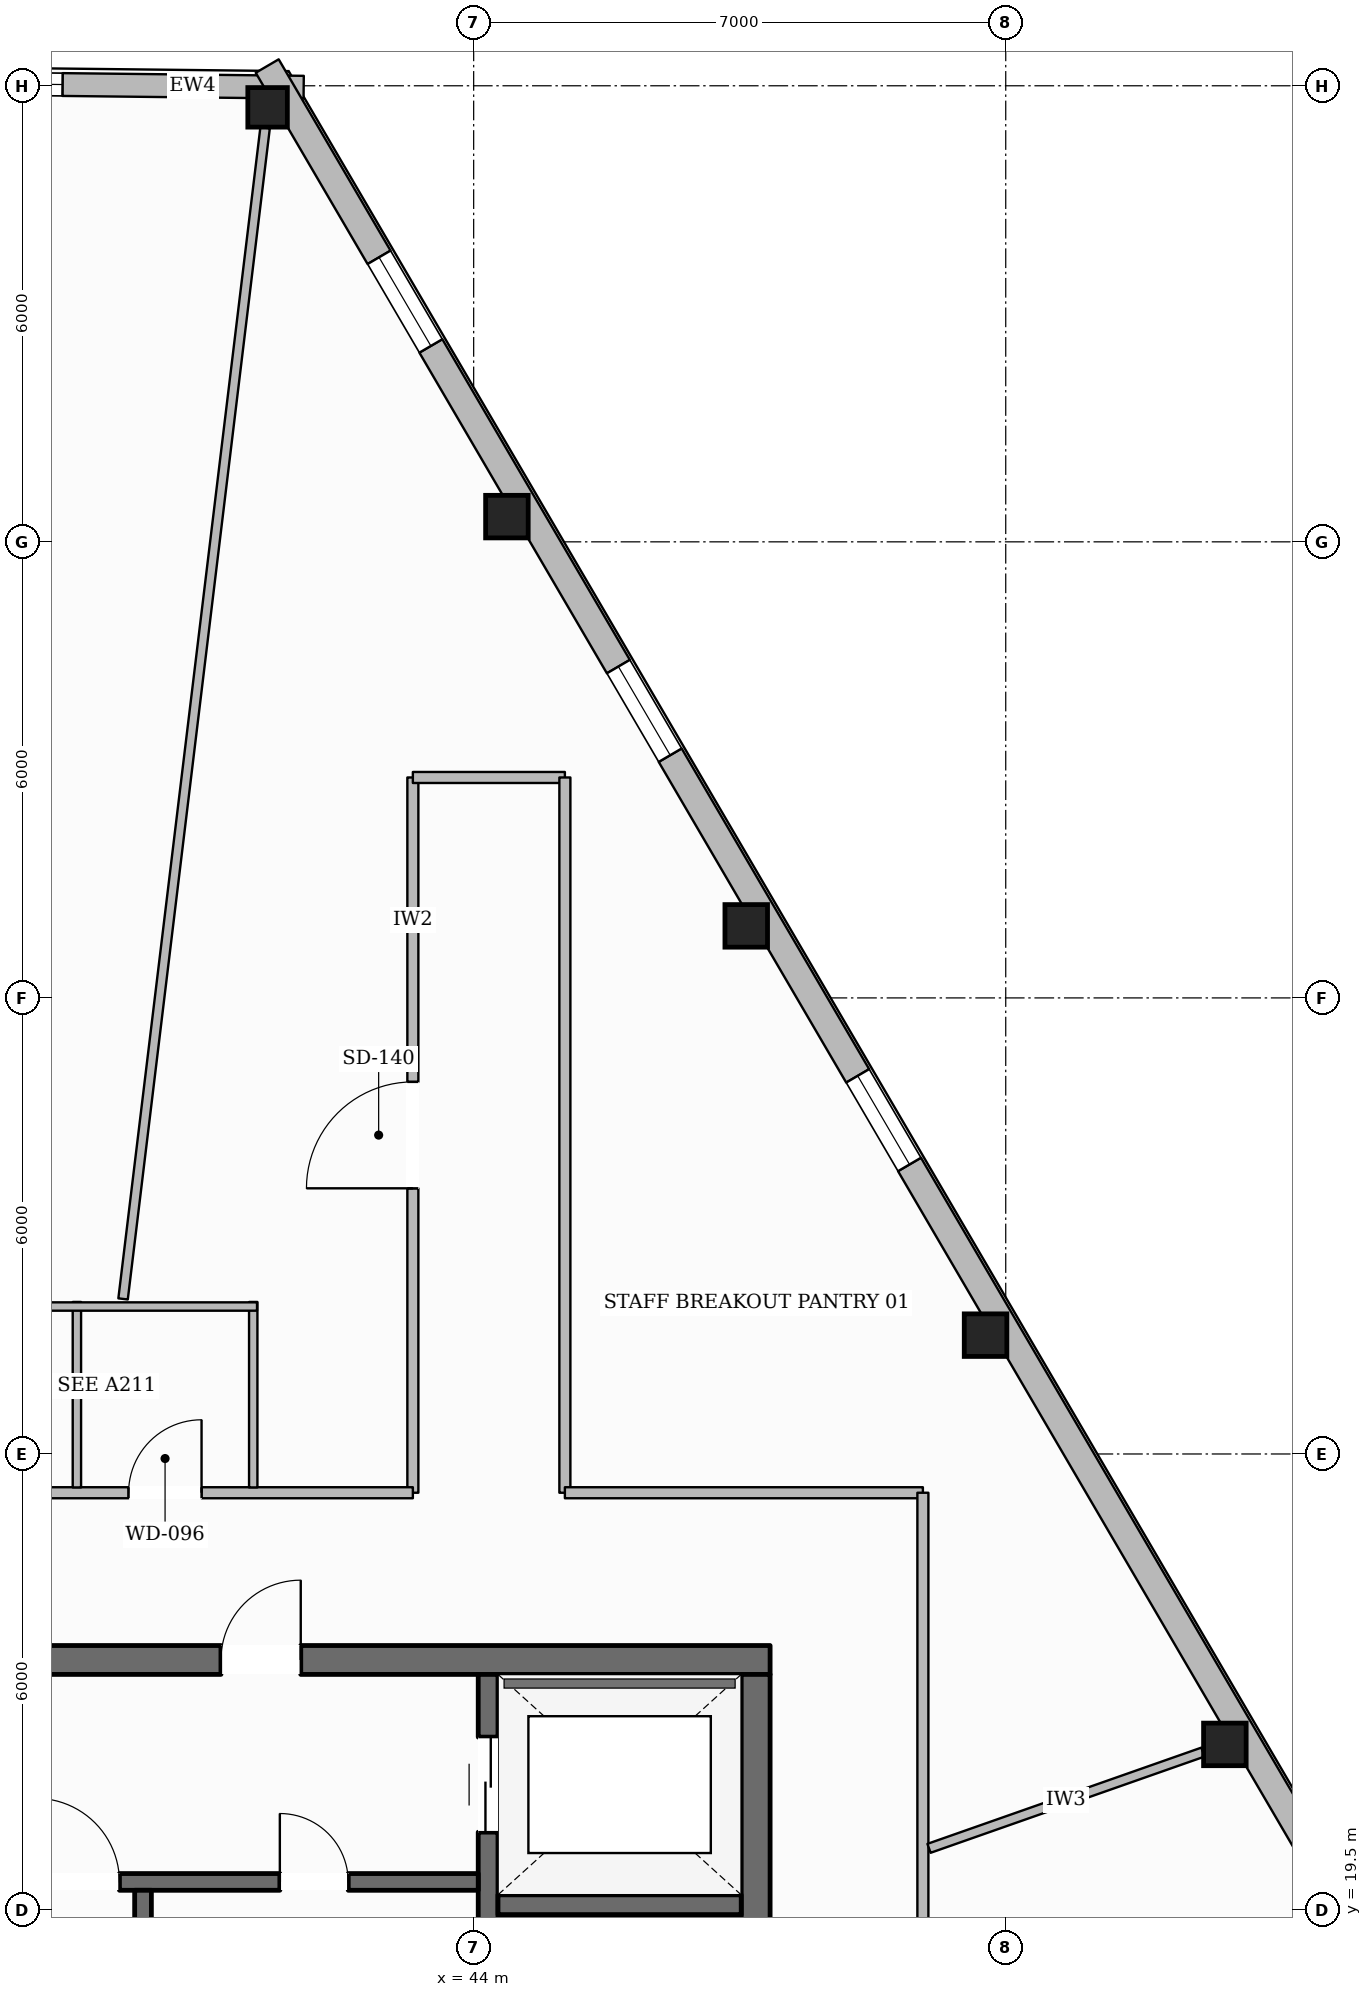
"""IFC4 building model, lengths in metres.
Left out: names, types, materials, properties, quantities, classifications, styles, units other than length and angle.
Written with IfcOpenShell. Run it as: python <this file> out.ifc"""

import sys

from ifc_helpers import new_model, si_unit, direction, frame, frame_2d, origin, origin_2d, place, context, subcontext, project, spatial, rectangle, hollow_rectangle, extrude, element, fill, save


model = new_model("IFC4")
c1 = context("Model", 3, precision=1e-05, world=origin(), true_north=direction((0.0, 1.0)))
c2 = subcontext(c1, "Body", "Model", "MODEL_VIEW")
j1 = project(units=[si_unit("LENGTHUNIT", "METRE"), si_unit("PLANEANGLEUNIT", "RADIAN")], contexts=[c1])
p1 = place(None, origin())
s1 = spatial("IfcSite", under=j1, at=p1, CompositionType="ELEMENT")
p2 = place(p1, origin())
s2 = spatial("IfcBuilding", under=s1, at=p2, CompositionType="ELEMENT")
p3 = place(p2, frame((0.0, 0.0, 258.75)))
s3 = spatial("IfcBuildingStorey", under=s2, at=p3, CompositionType="ELEMENT", Elevation=258.75)
p4 = place(p3, frame((28.1, 22.79, 0.0), z_axis=(0.0, 0.0, 1.0), x_axis=(1.0, 0.0, 0.0)))
e1 = element("IfcWall", 1, at=p4, inside=s3, PredefinedType="SOLIDWALL", context=c2, shape_type="SweptSolid", body=[
    extrude(rectangle(XDim=19.8, YDim=0.38, at=frame_2d((9.9, 0.0))), origin(), (0.0, 0.0, 1.0), 3.61),
])
p5 = place(p4, frame((6.175, 0.0, 0.0)))
e2 = element("IfcOpeningElement", 2, at=p5, cuts=e1, PredefinedType="OPENING", context=c2, shape_type="SweptSolid", body=[
    extrude(rectangle(XDim=1.05, YDim=2.15, at=frame_2d((0.525, 1.075))), frame((0.0, 0.2, 0.0), z_axis=(0.0, -1.0, 0.0), x_axis=(1.0, 0.0, 0.0)), (0.0, 0.0, 1.0), 0.4),
])
p6 = place(p4, frame((12.575, 0.0, 0.0)))
e3 = element("IfcOpeningElement", 3, at=p6, cuts=e1, PredefinedType="OPENING", context=c2, shape_type="SweptSolid", body=[
    extrude(rectangle(XDim=1.05, YDim=2.15, at=frame_2d((0.525, 1.075))), frame((0.0, 0.2, 0.0), z_axis=(0.0, -1.0, 0.0), x_axis=(1.0, 0.0, 0.0)), (0.0, 0.0, 1.0), 0.4),
])
p7 = place(p3, frame((47.71, 9.6, 0.0), z_axis=(0.0, 0.0, 1.0), x_axis=(0.0, 1.0, 0.0)))
e4 = element("IfcWall", 4, at=p7, inside=s3, PredefinedType="SOLIDWALL", context=c2, shape_type="SweptSolid", body=[
    extrude(rectangle(XDim=13.0, YDim=0.38, at=frame_2d((6.5, 0.0))), origin(), (0.0, 0.0, 1.0), 3.61),
])
p8 = place(p7, frame((0.2, 0.0, 0.0)))
e5 = element("IfcOpeningElement", 5, at=p8, cuts=e4, PredefinedType="OPENING", context=c2, shape_type="SweptSolid", body=[
    extrude(rectangle(XDim=1.1, YDim=2.15, at=frame_2d((0.55, 1.075))), frame((0.0, 0.2, 0.0), z_axis=(0.0, -1.0, 0.0), x_axis=(1.0, 0.0, 0.0)), (0.0, 0.0, 1.0), 0.4),
])
p9 = place(p7, frame((8.4, 0.0, 0.0)))
e6 = element("IfcOpeningElement", 6, at=p9, cuts=e4, PredefinedType="OPENING", context=c2, shape_type="SweptSolid", body=[
    extrude(rectangle(XDim=0.9, YDim=2.1, at=frame_2d((0.45, 1.05))), frame((0.0, 0.2, 0.0), z_axis=(0.0, -1.0, 0.0), x_axis=(1.0, 0.0, 0.0)), (0.0, 0.0, 1.0), 0.4),
])
p10 = place(p3, frame((44.19, 9.6, 0.0), z_axis=(0.0, 0.0, 1.0), x_axis=(0.0, 1.0, 0.0)))
e7 = element("IfcWall", 7, at=p10, inside=s3, PredefinedType="SHEAR", context=c2, shape_type="SweptSolid", body=[
    extrude(rectangle(XDim=13.0, YDim=0.26, at=frame_2d((6.5, 0.0))), origin(), (0.0, 0.0, 1.0), 3.61),
])
p11 = place(p10, frame((10.925, 0.0, 0.0)))
e8 = element("IfcOpeningElement", 8, at=p11, cuts=e7, PredefinedType="OPENING", context=c2, shape_type="SweptSolid", body=[
    extrude(rectangle(XDim=1.25, YDim=2.25, at=frame_2d((0.625, 1.125))), frame((0.0, 0.14, 0.0), z_axis=(0.0, -1.0, 0.0), x_axis=(1.0, 0.0, 0.0)), (0.0, 0.0, 1.0), 0.28),
])
p12 = place(p3, frame((44.32, 19.57, 0.0), z_axis=(0.0, 0.0, 1.0), x_axis=(1.0, 0.0, 0.0)))
e9 = element("IfcWall", 9, at=p12, inside=s3, PredefinedType="SHEAR", context=c2, shape_type="SweptSolid", body=[
    extrude(rectangle(XDim=3.2, YDim=0.26, at=frame_2d((1.6, 0.0))), origin(), (0.0, 0.0, 1.0), 3.61),
])
p13 = place(p3, frame((31.94, 19.87, 0.0), z_axis=(0.0, 0.0, 1.0), x_axis=(1.0, 0.0, 0.0)))
e10 = element("IfcWall", 10, at=p13, inside=s3, PredefinedType="SOLIDWALL", context=c2, shape_type="SweptSolid", body=[
    extrude(rectangle(XDim=12.12, YDim=0.22, at=frame_2d((6.06, 0.0))), origin(), (0.0, 0.0, 1.0), 3.61),
])
p14 = place(p13, frame((6.3, 0.0, 0.0)))
e11 = element("IfcOpeningElement", 11, at=p14, cuts=e10, PredefinedType="OPENING", context=c2, shape_type="SweptSolid", body=[
    extrude(rectangle(XDim=1.1, YDim=2.15, at=frame_2d((0.55, 1.075))), frame((0.0, 0.12, 0.0), z_axis=(0.0, -1.0, 0.0), x_axis=(1.0, 0.0, 0.0)), (0.0, 0.0, 1.0), 0.24),
])
p15 = place(p13, frame((9.51, 0.0, 0.0)))
e12 = element("IfcOpeningElement", 12, at=p15, cuts=e10, PredefinedType="OPENING", context=c2, shape_type="SweptSolid", body=[
    extrude(rectangle(XDim=0.9, YDim=2.1, at=frame_2d((0.45, 1.05))), frame((0.0, 0.12, 0.0), z_axis=(0.0, -1.0, 0.0), x_axis=(1.0, 0.0, 0.0)), (0.0, 0.0, 1.0), 0.24),
])
p16 = place(p3, frame((39.65, 16.56, 0.0), z_axis=(0.0, 0.0, 1.0), x_axis=(0.0, 1.0, 0.0)))
e13 = element("IfcWall", 13, at=p16, inside=s3, PredefinedType="SOLIDWALL", context=c2, shape_type="SweptSolid", body=[
    extrude(rectangle(XDim=3.2, YDim=0.22, at=frame_2d((1.6, 0.0))), origin(), (0.0, 0.0, 1.0), 3.61),
])
for number, where, z_axis, x_axis in (
    (14, (53.883, 21.679, 0.0), (0.0, 0.0, 1.0), (1.0, 0.0, 0.0)),
    (15, (50.734, 27.063, 0.0), (0.0, 0.0, 1.0), (1.0, 0.0, 0.0)),
    (16, (47.586, 32.448, 0.0), (0.0, 0.0, 1.0), (1.0, 0.0, 0.0)),
    (17, (44.437, 37.832, 0.0), (0.0, 0.0, 1.0), (1.0, 0.0, 0.0)),
):
    element("IfcColumn", number, at=place(p3, frame(where, z_axis=z_axis, x_axis=x_axis)), inside=s3, PredefinedType="COLUMN", context=c2, shape_type="SweptSolid", body=[
        extrude(hollow_rectangle(XDim=0.56, YDim=0.56, WallThickness=0.025, at=origin_2d()), origin(), (0.0, 0.0, 1.0), 3.61),
    ])
p17 = place(p3, frame((41.289, 43.216, 0.0), z_axis=(0.0, 0.0, 1.0), x_axis=(1.0, 0.0, 0.0)))
e18 = element("IfcColumn", 18, at=p17, inside=s3, PredefinedType="COLUMN", context=c2, shape_type="SweptSolid", body=[
    extrude(hollow_rectangle(XDim=0.52, YDim=0.52, WallThickness=0.024, at=origin_2d()), origin(), (0.0, 0.0, 1.0), 3.61),
])
p18 = place(p3, frame((34.367, 43.564, 0.0), z_axis=(0.0, 0.0, 1.0), x_axis=(0.999937028375, -0.011222267359, 0.0)))
e19 = element("IfcWall", 19, at=p18, inside=s3, PredefinedType="STANDARD", context=c2, shape_type="SweptSolid", body=[
    extrude(rectangle(XDim=7.397, YDim=0.3, at=frame_2d((3.698, 0.0))), origin(), (0.0, 0.0, 1.0), 3.196),
])
p19 = place(p18, frame((3.173, 0.0, 0.65)))
e20 = element("IfcOpeningElement", 20, at=p19, cuts=e19, PredefinedType="OPENING", context=c2, shape_type="SweptSolid", body=[
    extrude(rectangle(XDim=1.05, YDim=1.7, at=frame_2d((0.525, 0.85))), frame((0.0, 0.16, 0.0), z_axis=(0.0, -1.0, 0.0), x_axis=(1.0, 0.0, 0.0)), (0.0, 0.0, 1.0), 0.32),
])
p20 = place(p3, frame((41.284, 43.76, 0.0), z_axis=(0.0, 0.0, 1.0), x_axis=(0.50479404613, -0.863239810824, 0.0)))
e21 = element("IfcWall", 21, at=p20, inside=s3, PredefinedType="STANDARD", context=c2, shape_type="SweptSolid", body=[
    extrude(rectangle(XDim=38.372, YDim=0.35, at=frame_2d((19.186, 0.0))), origin(), (0.0, 0.0, 1.0), 3.196),
])
p21 = place(p20, frame((34.102, 0.0, 0.65)))
e22 = element("IfcOpeningElement", 22, at=p21, cuts=e21, PredefinedType="OPENING", context=c2, shape_type="SweptSolid", body=[
    extrude(rectangle(XDim=1.35, YDim=1.75, at=frame_2d((0.675, 0.875))), frame((0.0, 0.185, 0.0), z_axis=(0.0, -1.0, 0.0), x_axis=(1.0, 0.0, 0.0)), (0.0, 0.0, 1.0), 0.37),
])
p22 = place(p20, frame((27.864, 0.0, 0.65)))
e23 = element("IfcOpeningElement", 23, at=p22, cuts=e21, PredefinedType="OPENING", context=c2, shape_type="SweptSolid", body=[
    extrude(rectangle(XDim=1.35, YDim=1.75, at=frame_2d((0.675, 0.875))), frame((0.0, 0.185, 0.0), z_axis=(0.0, -1.0, 0.0), x_axis=(1.0, 0.0, 0.0)), (0.0, 0.0, 1.0), 0.37),
])
p23 = place(p20, frame((15.39, 0.0, 0.65)))
e24 = element("IfcOpeningElement", 24, at=p23, cuts=e21, PredefinedType="OPENING", context=c2, shape_type="SweptSolid", body=[
    extrude(rectangle(XDim=1.35, YDim=1.75, at=frame_2d((0.675, 0.875))), frame((0.0, 0.185, 0.0), z_axis=(0.0, -1.0, 0.0), x_axis=(1.0, 0.0, 0.0)), (0.0, 0.0, 1.0), 0.37),
])
p24 = place(p20, frame((9.153, 0.0, 0.65)))
e25 = element("IfcOpeningElement", 25, at=p24, cuts=e21, PredefinedType="OPENING", context=c2, shape_type="SweptSolid", body=[
    extrude(rectangle(XDim=1.35, YDim=1.75, at=frame_2d((0.675, 0.875))), frame((0.0, 0.185, 0.0), z_axis=(0.0, -1.0, 0.0), x_axis=(1.0, 0.0, 0.0)), (0.0, 0.0, 1.0), 0.37),
])
p25 = place(p20, frame((2.915, 0.0, 0.65)))
e26 = element("IfcOpeningElement", 26, at=p25, cuts=e21, PredefinedType="OPENING", context=c2, shape_type="SweptSolid", body=[
    extrude(rectangle(XDim=1.35, YDim=1.75, at=frame_2d((0.675, 0.875))), frame((0.0, 0.185, 0.0), z_axis=(0.0, -1.0, 0.0), x_axis=(1.0, 0.0, 0.0)), (0.0, 0.0, 1.0), 0.37),
])
p26 = place(p3, frame((43.2, 24.99, 0.0), z_axis=(0.0, 0.0, 1.0), x_axis=(0.0, 1.0, 0.0)))
e27 = element("IfcWall", 27, at=p26, inside=s3, PredefinedType="PARTITIONING", context=c2, shape_type="SweptSolid", body=[
    extrude(rectangle(XDim=9.41, YDim=0.145, at=frame_2d((4.705, 0.0))), origin(), (0.0, 0.0, 1.0), 3.61),
])
p27 = place(p26, frame((4.005, 0.0, 0.0)))
e28 = element("IfcOpeningElement", 28, at=p27, cuts=e27, PredefinedType="OPENING", context=c2, shape_type="SweptSolid", body=[
    extrude(rectangle(XDim=1.4, YDim=2.2, at=frame_2d((0.7, 1.1))), frame((0.0, 0.083, 0.0), z_axis=(0.0, -1.0, 0.0), x_axis=(1.0, 0.0, 0.0)), (0.0, 0.0, 1.0), 0.165),
])
p28 = place(p3, frame((43.2, 34.4, 0.0), z_axis=(0.0, 0.0, 1.0), x_axis=(1.0, 0.0, 0.0)))
e29 = element("IfcWall", 29, at=p28, inside=s3, PredefinedType="PARTITIONING", context=c2, shape_type="SweptSolid", body=[
    extrude(rectangle(XDim=2.0, YDim=0.145, at=frame_2d((1.0, 0.0))), origin(), (0.0, 0.0, 1.0), 3.61),
])
p29 = place(p3, frame((45.2, 34.4, 0.0), z_axis=(0.0, 0.0, 1.0), x_axis=(0.0, -1.0, 0.0)))
e30 = element("IfcWall", 30, at=p29, inside=s3, PredefinedType="PARTITIONING", context=c2, shape_type="SweptSolid", body=[
    extrude(rectangle(XDim=9.41, YDim=0.145, at=frame_2d((4.705, 0.0))), origin(), (0.0, 0.0, 1.0), 3.61),
])
p30 = place(p3, frame((45.2, 24.99, 0.0), z_axis=(0.0, 0.0, 1.0), x_axis=(1.0, 0.0, 0.0)))
e31 = element("IfcWall", 31, at=p30, inside=s3, PredefinedType="PARTITIONING", context=c2, shape_type="SweptSolid", body=[
    extrude(rectangle(XDim=4.71, YDim=0.145, at=frame_2d((2.355, 0.0))), origin(), (0.0, 0.0, 1.0), 3.61),
])
p31 = place(p3, frame((49.91, 24.99, 0.0), z_axis=(0.0, 0.0, 1.0), x_axis=(0.0, -1.0, 0.0)))
e32 = element("IfcWall", 32, at=p31, inside=s3, PredefinedType="PARTITIONING", context=c2, shape_type="SweptSolid", body=[
    extrude(rectangle(XDim=7.34, YDim=0.145, at=frame_2d((3.67, 0.0))), origin(), (0.0, 0.0, 1.0), 3.349),
])
p32 = place(p3, frame((26.09, 24.99, 0.0), z_axis=(0.0, 0.0, 1.0), x_axis=(1.0, 0.0, 0.0)))
e33 = element("IfcWall", 33, at=p32, inside=s3, PredefinedType="PARTITIONING", context=c2, shape_type="SweptSolid", body=[
    extrude(rectangle(XDim=17.11, YDim=0.145, at=frame_2d((8.555, 0.0))), origin(), (0.0, 0.0, 1.0), 3.61),
])
p33 = place(p32, frame((8.47, 0.0, 0.0)))
e34 = element("IfcOpeningElement", 34, at=p33, cuts=e33, PredefinedType="OPENING", context=c2, shape_type="SweptSolid", body=[
    extrude(rectangle(XDim=0.88, YDim=2.1, at=frame_2d((0.44, 1.05))), frame((0.0, 0.083, 0.0), z_axis=(0.0, -1.0, 0.0), x_axis=(1.0, 0.0, 0.0)), (0.0, 0.0, 1.0), 0.165),
])
p34 = place(p32, frame((10.99, 0.0, 0.0)))
e35 = element("IfcOpeningElement", 35, at=p34, cuts=e33, PredefinedType="OPENING", context=c2, shape_type="SweptSolid", body=[
    extrude(rectangle(XDim=0.88, YDim=2.1, at=frame_2d((0.44, 1.05))), frame((0.0, 0.083, 0.0), z_axis=(0.0, -1.0, 0.0), x_axis=(1.0, 0.0, 0.0)), (0.0, 0.0, 1.0), 0.165),
])
p35 = place(p32, frame((13.37, 0.0, 0.0)))
e36 = element("IfcOpeningElement", 36, at=p35, cuts=e33, PredefinedType="OPENING", context=c2, shape_type="SweptSolid", body=[
    extrude(rectangle(XDim=0.96, YDim=2.1, at=frame_2d((0.48, 1.05))), frame((0.0, 0.083, 0.0), z_axis=(0.0, -1.0, 0.0), x_axis=(1.0, 0.0, 0.0)), (0.0, 0.0, 1.0), 0.165),
])
p36 = place(p32, frame((4.257, 0.0, 0.0)))
e37 = element("IfcOpeningElement", 37, at=p36, cuts=e33, PredefinedType="OPENING", context=c2, shape_type="SweptSolid", body=[
    extrude(rectangle(XDim=1.4, YDim=2.2, at=frame_2d((0.7, 1.1))), frame((0.0, 0.083, 0.0), z_axis=(0.0, -1.0, 0.0), x_axis=(1.0, 0.0, 0.0)), (0.0, 0.0, 1.0), 0.165),
])
for number, where, z_axis, x_axis in (
    (38, (38.78, 25.06, 0.0), (0.0, 0.0, 1.0), (0.0, 1.0, 0.0)),
    (39, (41.1, 25.06, 0.0), (0.0, 0.0, 1.0), (0.0, 1.0, 0.0)),
):
    element("IfcWall", number, at=place(p3, frame(where, z_axis=z_axis, x_axis=x_axis)), inside=s3, PredefinedType="PLUMBINGWALL", context=c2, shape_type="SweptSolid", body=[
        extrude(rectangle(XDim=2.44, YDim=0.11, at=frame_2d((1.22, 0.0))), origin(), (0.0, 0.0, 1.0), 3.61),
    ])
p37 = place(p3, frame((33.69, 27.44, 0.0), z_axis=(0.0, 0.0, 1.0), x_axis=(1.0, 0.0, 0.0)))
e40 = element("IfcWall", 40, at=p37, inside=s3, PredefinedType="PLUMBINGWALL", context=c2, shape_type="SweptSolid", body=[
    extrude(rectangle(XDim=7.46, YDim=0.11, at=frame_2d((3.73, 0.0))), origin(), (0.0, 0.0, 1.0), 3.61),
])
p38 = place(p3, frame((49.99, 20.312, 0.0), z_axis=(0.0, 0.0, 1.0), x_axis=(0.943507124712, 0.331352237986, 0.0)))
e41 = element("IfcWall", 41, at=p38, inside=s3, PredefinedType="PARTITIONING", context=c2, shape_type="SweptSolid", body=[
    extrude(rectangle(XDim=3.82, YDim=0.125, at=frame_2d((1.91, 0.0))), origin(), (0.0, 0.0, 1.0), 3.61),
])
p39 = place(p3, frame((39.387, 27.54, 0.0), z_axis=(0.0, 0.0, 1.0), x_axis=(0.12041169592, 0.99272404196, 0.0)))
e42 = element("IfcWall", 42, at=p39, inside=s3, PredefinedType="PARTITIONING", context=c2, shape_type="SweptSolid", body=[
    extrude(rectangle(XDim=15.521, YDim=0.125, at=frame_2d((7.76, 0.0))), origin(), (0.0, 0.0, 1.0), 3.246),
])
p40 = place(p23, origin())
e43 = element("IfcWindow", 43, at=p40, inside=s3, PartitioningType="SINGLE_PANEL", PredefinedType="WINDOW", context=c2, shape_type="SweptSolid", body=[
    extrude(rectangle(XDim=1.35, YDim=1.75, at=frame_2d((0.675, 0.875))), frame((0.0, 0.03, 0.0), z_axis=(0.0, -1.0, 0.0), x_axis=(1.0, 0.0, 0.0)), (0.0, 0.0, 1.0), 0.06),
])
fill(e24, e43)
p41 = place(p24, origin())
e44 = element("IfcWindow", 44, at=p41, inside=s3, PartitioningType="SINGLE_PANEL", PredefinedType="WINDOW", context=c2, shape_type="SweptSolid", body=[
    extrude(rectangle(XDim=1.35, YDim=1.75, at=frame_2d((0.675, 0.875))), frame((0.0, 0.03, 0.0), z_axis=(0.0, -1.0, 0.0), x_axis=(1.0, 0.0, 0.0)), (0.0, 0.0, 1.0), 0.06),
])
fill(e25, e44)
p42 = place(p25, origin())
e45 = element("IfcWindow", 45, at=p42, inside=s3, PartitioningType="SINGLE_PANEL", PredefinedType="WINDOW", context=c2, shape_type="SweptSolid", body=[
    extrude(rectangle(XDim=1.35, YDim=1.75, at=frame_2d((0.675, 0.875))), frame((0.0, 0.03, 0.0), z_axis=(0.0, -1.0, 0.0), x_axis=(1.0, 0.0, 0.0)), (0.0, 0.0, 1.0), 0.06),
])
fill(e26, e45)
p43 = place(p19, origin())
e46 = element("IfcWindow", 46, at=p43, inside=s3, PartitioningType="SINGLE_PANEL", PredefinedType="WINDOW", context=c2, shape_type="SweptSolid", body=[
    extrude(rectangle(XDim=1.05, YDim=1.7, at=frame_2d((0.525, 0.85))), frame((0.0, 0.03, 0.0), z_axis=(0.0, -1.0, 0.0), x_axis=(1.0, 0.0, 0.0)), (0.0, 0.0, 1.0), 0.06),
])
fill(e20, e46)
p44 = place(p14, origin())
e47 = element("IfcDoor", 47, at=p44, inside=s3, OperationType="SINGLE_SWING_LEFT", PredefinedType="DOOR", context=c2, shape_type="SweptSolid", body=[
    extrude(rectangle(XDim=1.1, YDim=2.15, at=frame_2d((0.55, 1.075))), frame((0.0, 0.025, 0.0), z_axis=(0.0, -1.0, 0.0), x_axis=(1.0, 0.0, 0.0)), (0.0, 0.0, 1.0), 0.05),
])
fill(e11, e47)
p45 = place(p6, origin())
e48 = element("IfcDoor", 48, at=p45, inside=s3, OperationType="SINGLE_SWING_RIGHT", PredefinedType="DOOR", context=c2, shape_type="SweptSolid", body=[
    extrude(rectangle(XDim=1.05, YDim=2.15, at=frame_2d((0.525, 1.075))), frame((0.0, 0.025, 0.0), z_axis=(0.0, -1.0, 0.0), x_axis=(1.0, 0.0, 0.0)), (0.0, 0.0, 1.0), 0.05),
])
fill(e3, e48)
p46 = place(p11, origin())
e49 = element("IfcDoor", 49, at=p46, inside=s3, OperationType="DOUBLE_DOOR_SLIDING", PredefinedType="DOOR", context=c2, shape_type="SweptSolid", body=[
    extrude(rectangle(XDim=1.25, YDim=2.25, at=frame_2d((0.625, 1.125))), frame((0.0, 0.025, 0.0), z_axis=(0.0, -1.0, 0.0), x_axis=(1.0, 0.0, 0.0)), (0.0, 0.0, 1.0), 0.05),
])
fill(e8, e49)
p47 = place(p15, origin())
e50 = element("IfcDoor", 50, at=p47, inside=s3, OperationType="SINGLE_SWING_LEFT", PredefinedType="DOOR", context=c2, shape_type="SweptSolid", body=[
    extrude(rectangle(XDim=0.9, YDim=2.1, at=frame_2d((0.45, 1.05))), frame((0.0, 0.025, 0.0), z_axis=(0.0, -1.0, 0.0), x_axis=(1.0, 0.0, 0.0)), (0.0, 0.0, 1.0), 0.05),
])
fill(e12, e50)
p48 = place(p35, origin())
e51 = element("IfcDoor", 51, at=p48, inside=s3, OperationType="SINGLE_SWING_RIGHT", PredefinedType="DOOR", context=c2, shape_type="SweptSolid", body=[
    extrude(rectangle(XDim=0.96, YDim=2.1, at=frame_2d((0.48, 1.05))), frame((0.0, 0.025, 0.0), z_axis=(0.0, -1.0, 0.0), x_axis=(1.0, 0.0, 0.0)), (0.0, 0.0, 1.0), 0.05),
])
fill(e36, e51)
p49 = place(p27, origin())
e52 = element("IfcDoor", 52, at=p49, inside=s3, OperationType="SINGLE_SWING_LEFT", PredefinedType="DOOR", context=c2, shape_type="SweptSolid", body=[
    extrude(rectangle(XDim=1.4, YDim=2.2, at=frame_2d((0.7, 1.1))), frame((0.0, 0.025, 0.0), z_axis=(0.0, -1.0, 0.0), x_axis=(1.0, 0.0, 0.0)), (0.0, 0.0, 1.0), 0.05),
])
fill(e28, e52)
save(model, sys.argv[1])
